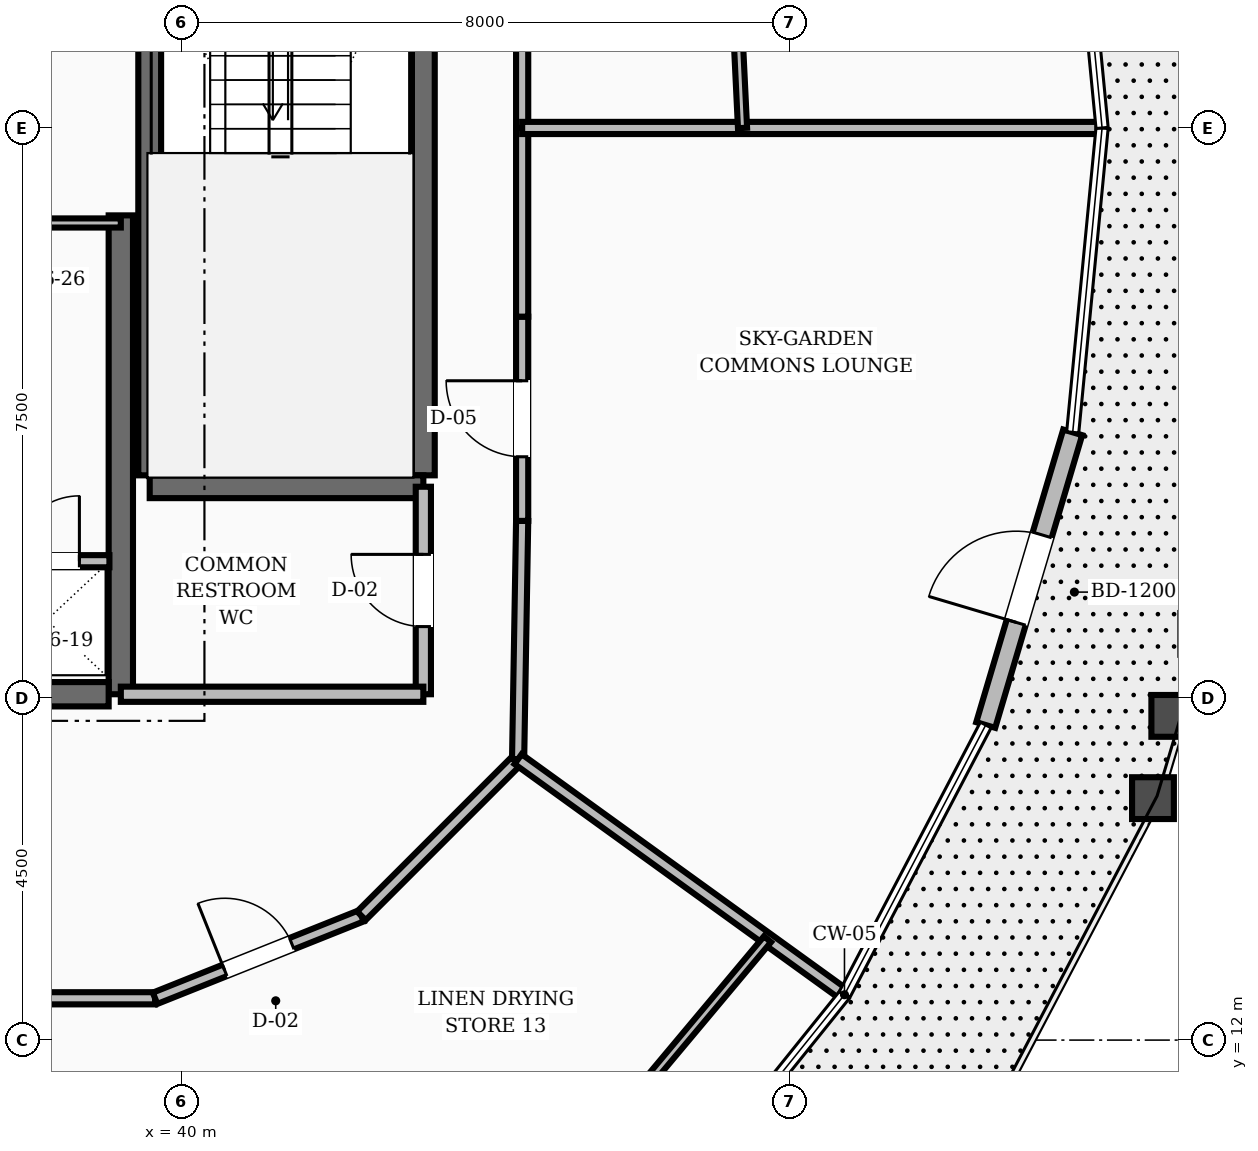
"""IFC4 building model, lengths in metres.
Left out: names, types, materials, properties, quantities, classifications, styles, units other than length and angle.
Written with IfcOpenShell. Run it as: python <this file> out.ifc"""

import sys

from ifc_helpers import new_model, si_unit, direction, frame, frame_2d, origin, place, context, subcontext, project, spatial, rectangle, extrude, element, fill, save


model = new_model("IFC4")
c1 = context("Model", 3, precision=1e-05, world=origin(), true_north=direction((0.0, 1.0)))
c2 = subcontext(c1, "Body", "Model", "MODEL_VIEW")
j1 = project(units=[si_unit("LENGTHUNIT", "METRE"), si_unit("PLANEANGLEUNIT", "RADIAN")], contexts=[c1])
p1 = place(None, origin())
s1 = spatial("IfcSite", under=j1, at=p1, CompositionType="ELEMENT")
p2 = place(p1, origin())
s2 = spatial("IfcBuilding", under=s1, at=p2, CompositionType="ELEMENT")
p3 = place(p2, frame((0.0, 0.0, 254.4)))
s3 = spatial("IfcBuildingStorey", under=s2, at=p3, CompositionType="ELEMENT", Elevation=254.4)
p4 = place(p3, frame((39.2, 16.55, 0.0), z_axis=(0.0, 0.0, 1.0), x_axis=(0.0, 1.0, 0.0)))
e1 = element("IfcWall", 1, at=p4, inside=s3, PredefinedType="SHEAR", context=c2, shape_type="SweptSolid", body=[
    extrude(rectangle(XDim=6.3, YDim=0.32, at=frame_2d((3.15, 0.0))), origin(), (0.0, 0.0, 1.0), 3.6),
])
p5 = place(p3, frame((35.8, 16.55, 0.0), z_axis=(0.0, 0.0, 1.0), x_axis=(1.0, 0.0, 0.0)))
e2 = element("IfcWall", 2, at=p5, inside=s3, PredefinedType="SHEAR", context=c2, shape_type="SweptSolid", body=[
    extrude(rectangle(XDim=3.24, YDim=0.32, at=frame_2d((1.62, 0.0))), origin(), (0.0, 0.0, 1.0), 3.6),
])
p6 = place(p5, frame((0.3, 0.0, 0.0)))
e3 = element("IfcOpeningElement", 3, at=p6, cuts=e2, PredefinedType="OPENING", context=c2, shape_type="SweptSolid", body=[
    extrude(rectangle(XDim=1.1, YDim=2.1, at=frame_2d((0.55, 1.05))), frame((0.0, 0.17, 0.0), z_axis=(0.0, -1.0, 0.0), x_axis=(1.0, 0.0, 0.0)), (0.0, 0.0, 1.0), 0.34),
])
for number, where, z_axis, x_axis in (
    (4, (43.18, 19.43, 0.0), (0.0, 0.0, 1.0), (0.0, 1.0, 0.0)),
    (5, (39.58, 19.43, 0.0), (0.0, 0.0, 1.0), (0.0, 1.0, 0.0)),
):
    element("IfcWall", number, at=place(p3, frame(where, z_axis=z_axis, x_axis=x_axis)), inside=s3, PredefinedType="SHEAR", context=c2, shape_type="SweptSolid", body=[
        extrude(rectangle(XDim=8.74, YDim=0.3, at=frame_2d((4.37, 0.0))), origin(), (0.0, 0.0, 1.0), 3.6),
    ])
p7 = place(p3, frame((39.58, 19.28, 0.0), z_axis=(0.0, 0.0, 1.0), x_axis=(1.0, 0.0, 0.0)))
e6 = element("IfcWall", 6, at=p7, inside=s3, PredefinedType="SHEAR", context=c2, shape_type="SweptSolid", body=[
    extrude(rectangle(XDim=3.6, YDim=0.3, at=frame_2d((1.8, 0.0))), origin(), (0.0, 0.0, 1.0), 3.6),
])
p8 = place(p3, frame((50.579, 16.145, 0.0), z_axis=(0.0, 0.0, 1.0), x_axis=(0.284876689728, 0.9585641719, 0.0)))
e7 = element("IfcWall", 7, at=p8, inside=s3, PredefinedType="STANDARD", context=c2, shape_type="SweptSolid", body=[
    extrude(rectangle(XDim=4.017, YDim=0.26, at=frame_2d((2.008, 0.0))), origin(), (0.0, 0.0, 1.0), 2.88),
])
p9 = place(p8, frame((1.408, 0.0, 0.0)))
e8 = element("IfcOpeningElement", 8, at=p9, cuts=e7, PredefinedType="OPENING", context=c2, shape_type="SweptSolid", body=[
    extrude(rectangle(XDim=1.2, YDim=2.15, at=frame_2d((0.6, 1.075))), frame((0.0, 0.14, 0.0), z_axis=(0.0, -1.0, 0.0), x_axis=(1.0, 0.0, 0.0)), (0.0, 0.0, 1.0), 0.28),
])
p10 = place(p3, frame((43.18, 16.55, 0.0), z_axis=(0.0, 0.0, 1.0), x_axis=(0.0, 1.0, 0.0)))
e9 = element("IfcWall", 9, at=p10, inside=s3, PredefinedType="SOLIDWALL", context=c2, shape_type="SweptSolid", body=[
    extrude(rectangle(XDim=2.73, YDim=0.2, at=frame_2d((1.365, 0.0))), origin(), (0.0, 0.0, 1.0), 2.87),
])
p11 = place(p10, frame((0.89, 0.0, 0.0)))
e10 = element("IfcOpeningElement", 10, at=p11, cuts=e9, PredefinedType="OPENING", context=c2, shape_type="SweptSolid", body=[
    extrude(rectangle(XDim=0.95, YDim=2.1, at=frame_2d((0.475, 1.05))), frame((0.0, 0.11, 0.0), z_axis=(0.0, -1.0, 0.0), x_axis=(1.0, 0.0, 0.0)), (0.0, 0.0, 1.0), 0.22),
])
p12 = place(p3, frame((39.2, 16.55, 0.0), z_axis=(0.0, 0.0, 1.0), x_axis=(1.0, 0.0, 0.0)))
e11 = element("IfcWall", 11, at=p12, inside=s3, PredefinedType="SOLIDWALL", context=c2, shape_type="SweptSolid", body=[
    extrude(rectangle(XDim=3.98, YDim=0.2, at=frame_2d((1.99, 0.0))), origin(), (0.0, 0.0, 1.0), 2.87),
])
p13 = place(p3, frame((37.4, 18.3, 0.0), z_axis=(0.0, 0.0, 1.0), x_axis=(1.0, 0.0, 0.0)))
e12 = element("IfcWall", 12, at=p13, inside=s3, PredefinedType="SOLIDWALL", context=c2, shape_type="SweptSolid", body=[
    extrude(rectangle(XDim=1.65, YDim=0.16, at=frame_2d((0.825, 0.0))), origin(), (0.0, 0.0, 1.0), 2.87),
])
p14 = place(p13, frame((0.395, 0.0, 0.0)))
e13 = element("IfcOpeningElement", 13, at=p14, cuts=e12, PredefinedType="OPENING", context=c2, shape_type="SweptSolid", body=[
    extrude(rectangle(XDim=0.86, YDim=2.1, at=frame_2d((0.43, 1.05))), frame((0.0, 0.09, 0.0), z_axis=(0.0, -1.0, 0.0), x_axis=(1.0, 0.0, 0.0)), (0.0, 0.0, 1.0), 0.18),
])
p15 = place(p3, frame((37.4, 22.75, 0.0), z_axis=(0.0, 0.0, 1.0), x_axis=(1.0, 0.0, 0.0)))
e14 = element("IfcWall", 14, at=p15, inside=s3, PredefinedType="PARTITIONING", context=c2, shape_type="SweptSolid", body=[
    extrude(rectangle(XDim=1.8, YDim=0.12, at=frame_2d((0.9, 0.0))), origin(), (0.0, 0.0, 1.0), 2.87),
])
p16 = place(p3, frame((44.48, 24.0, 0.0), z_axis=(0.0, 0.0, 1.0), x_axis=(0.0, 1.0, 0.0)))
e15 = element("IfcWall", 15, at=p16, inside=s3, PredefinedType="SOLIDWALL", context=c2, shape_type="SweptSolid", body=[
    extrude(rectangle(XDim=2.482, YDim=0.16, at=frame_2d((1.241, 0.0))), origin(), (0.0, 0.0, 1.0), 2.87),
])
p17 = place(p3, frame((36.743, 12.55, 0.0), z_axis=(0.0, 0.0, 1.0), x_axis=(1.0, 0.0, 0.0)))
e16 = element("IfcWall", 16, at=p17, inside=s3, PredefinedType="SOLIDWALL", context=c2, shape_type="SweptSolid", body=[
    extrude(rectangle(XDim=2.908, YDim=0.16, at=frame_2d((1.454, 0.0))), origin(), (0.0, 0.0, 1.0), 2.87),
])
p18 = place(p3, frame((39.651, 12.55, 0.0), z_axis=(0.0, 0.0, 1.0), x_axis=(0.92856882165, 0.371160266542, 0.0)))
e17 = element("IfcWall", 17, at=p18, inside=s3, PredefinedType="SOLIDWALL", context=c2, shape_type="SweptSolid", body=[
    extrude(rectangle(XDim=2.923, YDim=0.16, at=frame_2d((1.461, 0.0))), origin(), (0.0, 0.0, 1.0), 2.87),
])
p19 = place(p18, frame((0.987, 0.0, 0.0)))
e18 = element("IfcOpeningElement", 18, at=p19, cuts=e17, PredefinedType="OPENING", context=c2, shape_type="SweptSolid", body=[
    extrude(rectangle(XDim=0.95, YDim=2.1, at=frame_2d((0.475, 1.05))), frame((0.0, 0.09, 0.0), z_axis=(0.0, -1.0, 0.0), x_axis=(1.0, 0.0, 0.0)), (0.0, 0.0, 1.0), 0.18),
])
p20 = place(p3, frame((42.365, 13.635, 0.0), z_axis=(0.0, 0.0, 1.0), x_axis=(0.707106781187, 0.707106781187, 0.0)))
e19 = element("IfcWall", 19, at=p20, inside=s3, PredefinedType="SOLIDWALL", context=c2, shape_type="SweptSolid", body=[
    extrude(rectangle(XDim=2.916, YDim=0.16, at=frame_2d((1.458, 0.0))), origin(), (0.0, 0.0, 1.0), 2.87),
])
p21 = place(p3, frame((44.427, 15.697, 0.0), z_axis=(0.0, 0.0, 1.0), x_axis=(0.016981035134, 0.999855811828, 0.0)))
e20 = element("IfcWall", 20, at=p21, inside=s3, PredefinedType="SOLIDWALL", context=c2, shape_type="SweptSolid", body=[
    extrude(rectangle(XDim=3.134, YDim=0.16, at=frame_2d((1.567, 0.0))), origin(), (0.0, 0.0, 1.0), 2.87),
])
p22 = place(p3, frame((44.48, 18.831, 0.0), z_axis=(0.0, 0.0, 1.0), x_axis=(0.0, 1.0, 0.0)))
e21 = element("IfcWall", 21, at=p22, inside=s3, PredefinedType="SOLIDWALL", context=c2, shape_type="SweptSolid", body=[
    extrude(rectangle(XDim=2.687, YDim=0.16, at=frame_2d((1.344, 0.0))), origin(), (0.0, 0.0, 1.0), 2.87),
])
p23 = place(p22, frame((0.844, 0.0, 0.0)))
e22 = element("IfcOpeningElement", 22, at=p23, cuts=e21, PredefinedType="OPENING", context=c2, shape_type="SweptSolid", body=[
    extrude(rectangle(XDim=1.0, YDim=2.1, at=frame_2d((0.5, 1.05))), frame((0.0, 0.09, 0.0), z_axis=(0.0, -1.0, 0.0), x_axis=(1.0, 0.0, 0.0)), (0.0, 0.0, 1.0), 0.18),
])
p24 = place(p3, frame((44.48, 21.518, 0.0), z_axis=(0.0, 0.0, 1.0), x_axis=(0.0, 1.0, 0.0)))
e23 = element("IfcWall", 23, at=p24, inside=s3, PredefinedType="SOLIDWALL", context=c2, shape_type="SweptSolid", body=[
    extrude(rectangle(XDim=2.482, YDim=0.16, at=frame_2d((1.241, 0.0))), origin(), (0.0, 0.0, 1.0), 2.87),
])
p25 = place(p3, frame((44.427, 15.697, 0.0), z_axis=(0.0, 0.0, 1.0), x_axis=(0.810763897191, -0.585373302271, 0.0)))
e24 = element("IfcWall", 24, at=p25, inside=s3, PredefinedType="SOLIDWALL", context=c2, shape_type="SweptSolid", body=[
    extrude(rectangle(XDim=5.246, YDim=0.16, at=frame_2d((2.623, 0.0))), origin(), (0.0, 0.0, 1.0), 2.87),
])
p26 = place(p3, frame((44.48, 24.0, 0.0), z_axis=(0.0, 0.0, 1.0), x_axis=(1.0, 0.0, 0.0)))
e25 = element("IfcWall", 25, at=p26, inside=s3, PredefinedType="SOLIDWALL", context=c2, shape_type="SweptSolid", body=[
    extrude(rectangle(XDim=7.58, YDim=0.16, at=frame_2d((3.79, 0.0))), origin(), (0.0, 0.0, 1.0), 2.87),
])
p27 = place(p3, frame((47.379, 24.0, 0.0), z_axis=(0.0, 0.0, 1.0), x_axis=(-0.04788311561, 0.998852945753, 0.0)))
e26 = element("IfcWall", 26, at=p27, inside=s3, PredefinedType="PARTITIONING", context=c2, shape_type="SweptSolid", body=[
    extrude(rectangle(XDim=3.064, YDim=0.12, at=frame_2d((1.532, 0.0))), origin(), (0.0, 0.0, 1.0), 2.87),
])
p28 = place(p27, frame((1.102, 0.0, 0.0)))
e27 = element("IfcOpeningElement", 27, at=p28, cuts=e26, PredefinedType="OPENING", context=c2, shape_type="SweptSolid", body=[
    extrude(rectangle(XDim=0.86, YDim=2.1, at=frame_2d((0.43, 1.05))), frame((0.0, 0.07, 0.0), z_axis=(0.0, -1.0, 0.0), x_axis=(1.0, 0.0, 0.0)), (0.0, 0.0, 1.0), 0.14),
])
p29 = place(p3, frame((36.743, 12.55, 0.0), z_axis=(0.0, 0.0, 1.0), x_axis=(0.365790774428, -0.930697109345, 0.0)))
e28 = element("IfcWall", 28, at=p29, inside=s3, PredefinedType="SOLIDWALL", context=c2, shape_type="SweptSolid", body=[
    extrude(rectangle(XDim=8.022, YDim=0.16, at=frame_2d((4.011, 0.0))), origin(), (0.0, 0.0, 1.0), 2.87),
])
p30 = place(p3, frame((45.311, 10.465, 0.0), z_axis=(0.0, 0.0, 1.0), x_axis=(0.642015314971, 0.766691812492, 0.0)))
e29 = element("IfcWall", 29, at=p30, inside=s3, PredefinedType="PARTITIONING", context=c2, shape_type="SweptSolid", body=[
    extrude(rectangle(XDim=3.734, YDim=0.12, at=frame_2d((1.867, 0.0))), origin(), (0.0, 0.0, 1.0), 2.87),
])
p31 = place(p9, origin())
e30 = element("IfcDoor", 30, at=p31, inside=s3, OperationType="SINGLE_SWING_LEFT", PredefinedType="DOOR", context=c2, shape_type="SweptSolid", body=[
    extrude(rectangle(XDim=1.2, YDim=2.15, at=frame_2d((0.6, 1.075))), frame((0.0, 0.025, 0.0), z_axis=(0.0, -1.0, 0.0), x_axis=(1.0, 0.0, 0.0)), (0.0, 0.0, 1.0), 0.05),
])
fill(e8, e30)
p32 = place(p11, origin())
e31 = element("IfcDoor", 31, at=p32, inside=s3, OperationType="SINGLE_SWING_RIGHT", PredefinedType="DOOR", context=c2, shape_type="SweptSolid", body=[
    extrude(rectangle(XDim=0.95, YDim=2.1, at=frame_2d((0.475, 1.05))), frame((0.0, 0.025, 0.0), z_axis=(0.0, -1.0, 0.0), x_axis=(1.0, 0.0, 0.0)), (0.0, 0.0, 1.0), 0.05),
])
fill(e10, e31)
p33 = place(p14, origin())
e32 = element("IfcDoor", 32, at=p33, inside=s3, OperationType="SINGLE_SWING_RIGHT", PredefinedType="TRAPDOOR", context=c2, shape_type="SweptSolid", body=[
    extrude(rectangle(XDim=0.86, YDim=2.1, at=frame_2d((0.43, 1.05))), frame((0.0, 0.025, 0.0), z_axis=(0.0, -1.0, 0.0), x_axis=(1.0, 0.0, 0.0)), (0.0, 0.0, 1.0), 0.05),
])
fill(e13, e32)
p34 = place(p23, origin())
e33 = element("IfcDoor", 33, at=p34, inside=s3, OperationType="SINGLE_SWING_RIGHT", PredefinedType="DOOR", context=c2, shape_type="SweptSolid", body=[
    extrude(rectangle(XDim=1.0, YDim=2.1, at=frame_2d((0.5, 1.05))), frame((0.0, 0.025, 0.0), z_axis=(0.0, -1.0, 0.0), x_axis=(1.0, 0.0, 0.0)), (0.0, 0.0, 1.0), 0.05),
])
fill(e22, e33)
p35 = place(p19, origin())
e34 = element("IfcDoor", 34, at=p35, inside=s3, OperationType="SINGLE_SWING_LEFT", PredefinedType="DOOR", context=c2, shape_type="SweptSolid", body=[
    extrude(rectangle(XDim=0.95, YDim=2.1, at=frame_2d((0.475, 1.05))), frame((0.0, 0.025, 0.0), z_axis=(0.0, -1.0, 0.0), x_axis=(1.0, 0.0, 0.0)), (0.0, 0.0, 1.0), 0.05),
])
fill(e18, e34)
save(model, sys.argv[1])
